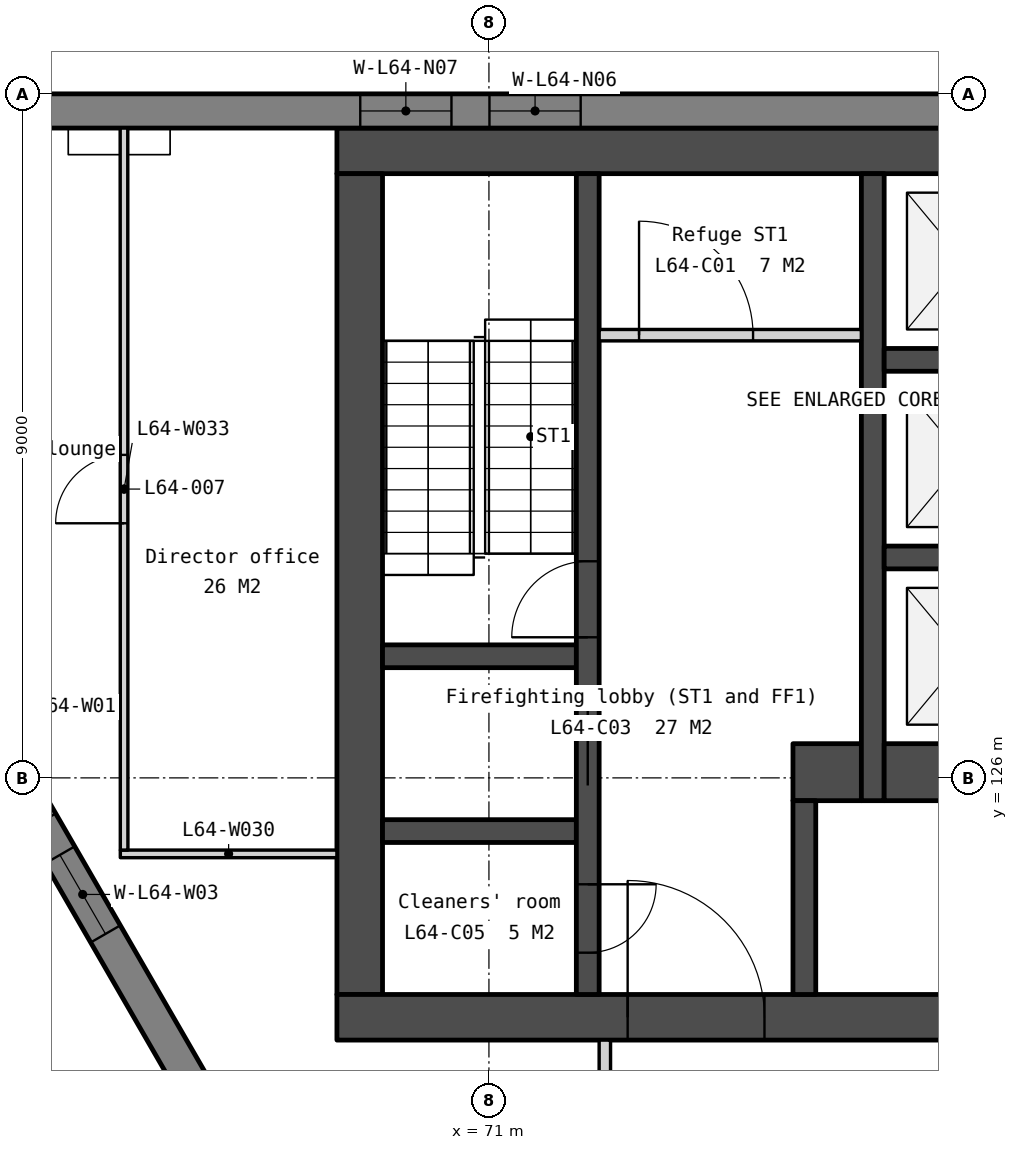
"""IFC4 building model, lengths in metres.
Left out: names, types, materials, properties, quantities, classifications, styles, units other than length and angle.
Written with IfcOpenShell. Run it as: python <this file> out.ifc"""

import sys

from ifc_helpers import new_model, si_unit, direction, frame, frame_2d, origin, place, context, subcontext, project, spatial, polyline, rectangle, outline, extrude, element, fill, save


model = new_model("IFC4")
c1 = context("Model", 3, precision=1e-05, world=origin(), true_north=direction((0.0, 1.0)))
c2 = subcontext(c1, "Body", "Model", "MODEL_VIEW")
j1 = project(units=[si_unit("LENGTHUNIT", "METRE"), si_unit("PLANEANGLEUNIT", "RADIAN")], contexts=[c1])
p1 = place(None, origin())
s1 = spatial("IfcSite", under=j1, at=p1, CompositionType="ELEMENT")
p2 = place(p1, origin())
s2 = spatial("IfcBuilding", under=s1, at=p2, CompositionType="ELEMENT")
p3 = place(p2, frame((0.0, 0.0, 262.1)))
s3 = spatial("IfcBuildingStorey", under=s2, at=p3, CompositionType="ELEMENT", Elevation=262.1)
p4 = place(p3, frame((69.0, 134.25, 0.0), z_axis=(0.0, 0.0, 1.0), x_axis=(1.0, 0.0, 0.0)))
e1 = element("IfcWall", 1, at=p4, inside=s3, PredefinedType="SOLIDWALL", context=c2, shape_type="SweptSolid", body=[
    extrude(rectangle(XDim=22.0, YDim=0.6, at=frame_2d((11.0, 0.0))), origin(), (0.0, 0.0, 1.0), 3.75),
])
p5 = place(p3, frame((69.3, 133.95, 0.0), z_axis=(0.0, 0.0, 1.0), x_axis=(0.0, -1.0, 0.0)))
e2 = element("IfcWall", 2, at=p5, inside=s3, PredefinedType="SOLIDWALL", context=c2, shape_type="SweptSolid", body=[
    extrude(rectangle(XDim=10.8, YDim=0.6, at=frame_2d((5.4, 0.0))), origin(), (0.0, 0.0, 1.0), 3.75),
])
p6 = place(p3, frame((69.0, 122.85, 0.0), z_axis=(0.0, 0.0, 1.0), x_axis=(1.0, 0.0, 0.0)))
e3 = element("IfcWall", 3, at=p6, inside=s3, PredefinedType="SOLIDWALL", context=c2, shape_type="SweptSolid", body=[
    extrude(rectangle(XDim=22.0, YDim=0.6, at=frame_2d((11.0, 0.0))), origin(), (0.0, 0.0, 1.0), 3.75),
])
p7 = place(p6, frame((16.375, 0.0, 0.0)))
e4 = element("IfcOpeningElement", 4, at=p7, cuts=e3, PredefinedType="OPENING", context=c2, shape_type="SweptSolid", body=[
    extrude(rectangle(XDim=1.8, YDim=2.1, at=frame_2d((0.9, 1.05))), frame((0.0, 0.31, 0.0), z_axis=(0.0, -1.0, 0.0), x_axis=(1.0, 0.0, 0.0)), (0.0, 0.0, 1.0), 0.62),
])
p8 = place(p6, frame((3.825, 0.0, 0.0)))
e5 = element("IfcOpeningElement", 5, at=p8, cuts=e3, PredefinedType="OPENING", context=c2, shape_type="SweptSolid", body=[
    extrude(rectangle(XDim=1.8, YDim=2.1, at=frame_2d((0.9, 1.05))), frame((0.0, 0.31, 0.0), z_axis=(0.0, -1.0, 0.0), x_axis=(1.0, 0.0, 0.0)), (0.0, 0.0, 1.0), 0.62),
])
p9 = place(p6, frame((12.85, 0.0, 0.0)))
e6 = element("IfcOpeningElement", 6, at=p9, cuts=e3, PredefinedType="OPENING", context=c2, shape_type="SweptSolid", body=[
    extrude(rectangle(XDim=1.5, YDim=2.1, at=frame_2d((0.75, 1.05))), frame((0.0, 0.31, 0.0), z_axis=(0.0, -1.0, 0.0), x_axis=(1.0, 0.0, 0.0)), (0.0, 0.0, 1.0), 0.62),
])
for number, where, z_axis, x_axis in (
    (7, (69.6, 127.6, 0.0), (0.0, 0.0, 1.0), (1.0, 0.0, 0.0)),
    (8, (69.6, 125.3, 0.0), (0.0, 0.0, 1.0), (1.0, 0.0, 0.0)),
):
    element("IfcWall", number, at=place(p3, frame(where, z_axis=z_axis, x_axis=x_axis)), inside=s3, PredefinedType="SOLIDWALL", context=c2, shape_type="SweptSolid", body=[
        extrude(rectangle(XDim=2.55, YDim=0.3, at=frame_2d((1.275, 0.0))), origin(), (0.0, 0.0, 1.0), 3.75),
    ])
p10 = place(p3, frame((72.3, 133.95, 0.0), z_axis=(0.0, 0.0, 1.0), x_axis=(0.0, -1.0, 0.0)))
e9 = element("IfcWall", 9, at=p10, inside=s3, PredefinedType="SOLIDWALL", context=c2, shape_type="SweptSolid", body=[
    extrude(rectangle(XDim=10.8, YDim=0.3, at=frame_2d((5.4, 0.0))), origin(), (0.0, 0.0, 1.0), 3.75),
])
p11 = place(p10, frame((6.95, 0.0, 0.0)))
e10 = element("IfcOpeningElement", 10, at=p11, cuts=e9, PredefinedType="OPENING", context=c2, shape_type="SweptSolid", body=[
    extrude(rectangle(XDim=1.1, YDim=2.1, at=frame_2d((0.55, 1.05))), frame((0.0, 0.16, 0.0), z_axis=(0.0, -1.0, 0.0), x_axis=(1.0, 0.0, 0.0)), (0.0, 0.0, 1.0), 0.32),
])
p12 = place(p10, frame((9.35, 0.0, 0.0)))
e11 = element("IfcOpeningElement", 11, at=p12, cuts=e9, PredefinedType="OPENING", context=c2, shape_type="SweptSolid", body=[
    extrude(rectangle(XDim=0.9, YDim=2.1, at=frame_2d((0.45, 1.05))), frame((0.0, 0.16, 0.0), z_axis=(0.0, -1.0, 0.0), x_axis=(1.0, 0.0, 0.0)), (0.0, 0.0, 1.0), 0.32),
])
p13 = place(p10, frame((5.1, 0.0, 0.0)))
e12 = element("IfcOpeningElement", 12, at=p13, cuts=e9, PredefinedType="OPENING", context=c2, shape_type="SweptSolid", body=[
    extrude(rectangle(XDim=1.0, YDim=2.1, at=frame_2d((0.5, 1.05))), frame((0.0, 0.16, 0.0), z_axis=(0.0, -1.0, 0.0), x_axis=(1.0, 0.0, 0.0)), (0.0, 0.0, 1.0), 0.32),
])
p14 = place(p3, frame((72.45, 131.825, 0.0), z_axis=(0.0, 0.0, 1.0), x_axis=(1.0, 0.0, 0.0)))
e13 = element("IfcWall", 13, at=p14, inside=s3, PredefinedType="PARTITIONING", context=c2, shape_type="SweptSolid", body=[
    extrude(rectangle(XDim=3.45, YDim=0.15, at=frame_2d((1.725, 0.0))), origin(), (0.0, 0.0, 1.0), 3.75),
])
p15 = place(p14, frame((0.525, 0.0, 0.0)))
e14 = element("IfcOpeningElement", 14, at=p15, cuts=e13, PredefinedType="OPENING", context=c2, shape_type="SweptSolid", body=[
    extrude(rectangle(XDim=1.5, YDim=2.1, at=frame_2d((0.75, 1.05))), frame((0.0, 0.085, 0.0), z_axis=(0.0, -1.0, 0.0), x_axis=(1.0, 0.0, 0.0)), (0.0, 0.0, 1.0), 0.17),
])
p16 = place(p3, frame((75.0, 126.075, 0.0), z_axis=(0.0, 0.0, 1.0), x_axis=(1.0, 0.0, 0.0)))
e15 = element("IfcWall", 15, at=p16, inside=s3, PredefinedType="SOLIDWALL", context=c2, shape_type="SweptSolid", body=[
    extrude(rectangle(XDim=0.9, YDim=0.75, at=frame_2d((0.45, 0.0))), origin(), (0.0, 0.0, 1.0), 3.75),
])
p17 = place(p3, frame((75.15, 125.7, 0.0), z_axis=(0.0, 0.0, 1.0), x_axis=(0.0, -1.0, 0.0)))
e16 = element("IfcWall", 16, at=p17, inside=s3, PredefinedType="SOLIDWALL", context=c2, shape_type="SweptSolid", body=[
    extrude(rectangle(XDim=2.55, YDim=0.3, at=frame_2d((1.275, 0.0))), origin(), (0.0, 0.0, 1.0), 3.75),
])
p18 = place(p3, frame((76.05, 133.95, 0.0), z_axis=(0.0, 0.0, 1.0), x_axis=(0.0, -1.0, 0.0)))
e17 = element("IfcWall", 17, at=p18, inside=s3, PredefinedType="SOLIDWALL", context=c2, shape_type="SweptSolid", body=[
    extrude(rectangle(XDim=8.25, YDim=0.3, at=frame_2d((4.125, 0.0))), origin(), (0.0, 0.0, 1.0), 3.75),
])
for number, where, z_axis, x_axis in (
    (18, (76.2, 131.5, 0.0), (0.0, 0.0, 1.0), (1.0, 0.0, 0.0)),
    (19, (76.2, 128.9, 0.0), (0.0, 0.0, 1.0), (1.0, 0.0, 0.0)),
):
    element("IfcWall", number, at=place(p3, frame(where, z_axis=z_axis, x_axis=x_axis)), inside=s3, PredefinedType="SOLIDWALL", context=c2, shape_type="SweptSolid", body=[
        extrude(rectangle(XDim=2.1, YDim=0.3, at=frame_2d((1.05, 0.0))), origin(), (0.0, 0.0, 1.0), 3.75),
    ])
p19 = place(p3, frame((76.2, 126.075, 0.0), z_axis=(0.0, 0.0, 1.0), x_axis=(1.0, 0.0, 0.0)))
e20 = element("IfcWall", 20, at=p19, inside=s3, PredefinedType="SOLIDWALL", context=c2, shape_type="SweptSolid", body=[
    extrude(rectangle(XDim=2.1, YDim=0.75, at=frame_2d((1.05, 0.0))), origin(), (0.0, 0.0, 1.0), 3.75),
])
p20 = place(p3, frame((98.486, 134.775, -0.15), z_axis=(0.0, 0.0, 1.0), x_axis=(-1.0, 0.0, 0.0)))
e21 = element("IfcWall", 21, at=p20, inside=s3, PredefinedType="SOLIDWALL", context=c2, shape_type="SweptSolid", body=[
    extrude(outline(polyline([(36.972, 0.0), (36.972, 3.9), (0.0, 3.9), (0.0, 0.0), (36.972, 0.0)])), frame((0.0, 0.225, 0.0), z_axis=(0.0, -1.0, 0.0), x_axis=(1.0, 0.0, 0.0)), (0.0, 0.0, 1.0), 0.45),
])
p21 = place(p20, frame((0.744, 0.0, 0.95)))
e22 = element("IfcOpeningElement", 22, at=p21, cuts=e21, PredefinedType="OPENING", context=c2, shape_type="SweptSolid", body=[
    extrude(rectangle(XDim=1.2, YDim=2.2, at=frame_2d((0.6, 1.1))), frame((0.0, 0.235, 0.0), z_axis=(0.0, -1.0, 0.0), x_axis=(1.0, 0.0, 0.0)), (0.0, 0.0, 1.0), 0.47),
])
p22 = place(p20, frame((7.793, 0.0, 0.95)))
e23 = element("IfcOpeningElement", 23, at=p22, cuts=e21, PredefinedType="OPENING", context=c2, shape_type="SweptSolid", body=[
    extrude(rectangle(XDim=1.2, YDim=2.2, at=frame_2d((0.6, 1.1))), frame((0.0, 0.235, 0.0), z_axis=(0.0, -1.0, 0.0), x_axis=(1.0, 0.0, 0.0)), (0.0, 0.0, 1.0), 0.47),
])
p23 = place(p20, frame((9.493, 0.0, 0.95)))
e24 = element("IfcOpeningElement", 24, at=p23, cuts=e21, PredefinedType="OPENING", context=c2, shape_type="SweptSolid", body=[
    extrude(rectangle(XDim=1.2, YDim=2.2, at=frame_2d((0.6, 1.1))), frame((0.0, 0.235, 0.0), z_axis=(0.0, -1.0, 0.0), x_axis=(1.0, 0.0, 0.0)), (0.0, 0.0, 1.0), 0.47),
])
p24 = place(p20, frame((17.036, 0.0, 0.95)))
e25 = element("IfcOpeningElement", 25, at=p24, cuts=e21, PredefinedType="OPENING", context=c2, shape_type="SweptSolid", body=[
    extrude(rectangle(XDim=1.2, YDim=2.2, at=frame_2d((0.6, 1.1))), frame((0.0, 0.235, 0.0), z_axis=(0.0, -1.0, 0.0), x_axis=(1.0, 0.0, 0.0)), (0.0, 0.0, 1.0), 0.47),
])
p25 = place(p20, frame((18.736, 0.0, 0.95)))
e26 = element("IfcOpeningElement", 26, at=p25, cuts=e21, PredefinedType="OPENING", context=c2, shape_type="SweptSolid", body=[
    extrude(rectangle(XDim=1.2, YDim=2.2, at=frame_2d((0.6, 1.1))), frame((0.0, 0.235, 0.0), z_axis=(0.0, -1.0, 0.0), x_axis=(1.0, 0.0, 0.0)), (0.0, 0.0, 1.0), 0.47),
])
p26 = place(p20, frame((26.279, 0.0, 0.95)))
e27 = element("IfcOpeningElement", 27, at=p26, cuts=e21, PredefinedType="OPENING", context=c2, shape_type="SweptSolid", body=[
    extrude(rectangle(XDim=1.2, YDim=2.2, at=frame_2d((0.6, 1.1))), frame((0.0, 0.235, 0.0), z_axis=(0.0, -1.0, 0.0), x_axis=(1.0, 0.0, 0.0)), (0.0, 0.0, 1.0), 0.47),
])
p27 = place(p20, frame((27.979, 0.0, 0.95)))
e28 = element("IfcOpeningElement", 28, at=p27, cuts=e21, PredefinedType="OPENING", context=c2, shape_type="SweptSolid", body=[
    extrude(rectangle(XDim=1.2, YDim=2.2, at=frame_2d((0.6, 1.1))), frame((0.0, 0.235, 0.0), z_axis=(0.0, -1.0, 0.0), x_axis=(1.0, 0.0, 0.0)), (0.0, 0.0, 1.0), 0.47),
])
p28 = place(p20, frame((35.028, 0.0, 0.95)))
e29 = element("IfcOpeningElement", 29, at=p28, cuts=e21, PredefinedType="OPENING", context=c2, shape_type="SweptSolid", body=[
    extrude(rectangle(XDim=1.2, YDim=2.2, at=frame_2d((0.6, 1.1))), frame((0.0, 0.235, 0.0), z_axis=(0.0, -1.0, 0.0), x_axis=(1.0, 0.0, 0.0)), (0.0, 0.0, 1.0), 0.47),
])
p29 = place(p3, frame((60.609, 133.207, -0.15), z_axis=(0.0, 0.0, 1.0), x_axis=(0.499996022837, -0.866027699989, 0.0)))
e30 = element("IfcWall", 30, at=p29, inside=s3, PredefinedType="SOLIDWALL", context=c2, shape_type="SweptSolid", body=[
    extrude(outline(polyline([(0.0, 0.0), (0.0, 3.9), (16.686, 3.9), (16.686, 0.0), (0.0, 0.0)])), frame((0.0, 0.225, 0.0), z_axis=(0.0, -1.0, 0.0), x_axis=(1.0, 0.0, 0.0)), (0.0, 0.0, 1.0), 0.45),
])
p30 = place(p29, frame((0.744, 0.0, 0.95)))
e31 = element("IfcOpeningElement", 31, at=p30, cuts=e30, PredefinedType="OPENING", context=c2, shape_type="SweptSolid", body=[
    extrude(rectangle(XDim=1.2, YDim=2.2, at=frame_2d((0.6, 1.1))), frame((0.0, 0.235, 0.0), z_axis=(0.0, -1.0, 0.0), x_axis=(1.0, 0.0, 0.0)), (0.0, 0.0, 1.0), 0.47),
])
p31 = place(p29, frame((7.793, 0.0, 0.95)))
e32 = element("IfcOpeningElement", 32, at=p31, cuts=e30, PredefinedType="OPENING", context=c2, shape_type="SweptSolid", body=[
    extrude(rectangle(XDim=1.2, YDim=2.2, at=frame_2d((0.6, 1.1))), frame((0.0, 0.235, 0.0), z_axis=(0.0, -1.0, 0.0), x_axis=(1.0, 0.0, 0.0)), (0.0, 0.0, 1.0), 0.47),
])
p32 = place(p29, frame((9.493, 0.0, 0.95)))
e33 = element("IfcOpeningElement", 33, at=p32, cuts=e30, PredefinedType="OPENING", context=c2, shape_type="SweptSolid", body=[
    extrude(rectangle(XDim=1.2, YDim=2.2, at=frame_2d((0.6, 1.1))), frame((0.0, 0.235, 0.0), z_axis=(0.0, -1.0, 0.0), x_axis=(1.0, 0.0, 0.0)), (0.0, 0.0, 1.0), 0.47),
])
p33 = place(p3, frame((72.525, 119.748, 0.0), z_axis=(0.0, 0.0, 1.0), x_axis=(0.0, 1.0, 0.0)))
e34 = element("IfcWall", 34, at=p33, inside=s3, PredefinedType="PARTITIONING", context=c2, shape_type="SweptSolid", body=[
    extrude(rectangle(XDim=2.802, YDim=0.15, at=frame_2d((1.401, 0.0))), origin(), (0.0, 0.0, 1.0), 3.75),
])
p34 = place(p33, frame((1.036, 0.0, 0.0)))
e35 = element("IfcOpeningElement", 35, at=p34, cuts=e34, PredefinedType="OPENING", context=c2, shape_type="SweptSolid", body=[
    extrude(rectangle(XDim=1.0, YDim=2.1, at=frame_2d((0.5, 1.05))), frame((0.0, 0.085, 0.0), z_axis=(0.0, -1.0, 0.0), x_axis=(1.0, 0.0, 0.0)), (0.0, 0.0, 1.0), 0.17),
])
p35 = place(p3, frame((66.15, 125.0, 0.0), z_axis=(0.0, 0.0, 1.0), x_axis=(1.0, 0.0, 0.0)))
e36 = element("IfcWall", 36, at=p35, inside=s3, PredefinedType="PARTITIONING", context=c2, shape_type="SweptSolid", body=[
    extrude(rectangle(XDim=2.85, YDim=0.1, at=frame_2d((1.425, 0.0))), origin(), (0.0, 0.0, 1.0), 3.75),
])
p36 = place(p3, frame((66.2, 125.05, 0.0), z_axis=(0.0, 0.0, 1.0), x_axis=(-0.000205592101, 0.999999978866, 0.0)))
e37 = element("IfcWall", 37, at=p36, inside=s3, PredefinedType="PARTITIONING", context=c2, shape_type="SweptSolid", body=[
    extrude(rectangle(XDim=9.5, YDim=0.1, at=frame_2d((4.75, 0.0))), origin(), (0.0, 0.0, 1.0), 3.75),
])
p37 = place(p36, frame((4.3, 0.0, 0.0)))
e38 = element("IfcOpeningElement", 38, at=p37, cuts=e37, PredefinedType="OPENING", context=c2, shape_type="SweptSolid", body=[
    extrude(rectangle(XDim=0.9, YDim=2.1, at=frame_2d((0.45, 1.05))), frame((0.0, 0.06, 0.0), z_axis=(0.0, -1.0, 0.0), x_axis=(1.0, 0.0, 0.0)), (0.0, 0.0, 1.0), 0.12),
])
p38 = place(p11, origin())
e39 = element("IfcDoor", 39, at=p38, inside=s3, OperationType="SLIDING_TO_LEFT", PredefinedType="DOOR", context=c2, shape_type="SweptSolid", body=[
    extrude(rectangle(XDim=1.1, YDim=2.1, at=frame_2d((0.55, 1.05))), frame((0.0, 0.025, 0.0), z_axis=(0.0, -1.0, 0.0), x_axis=(1.0, 0.0, 0.0)), (0.0, 0.0, 1.0), 0.05),
])
fill(e10, e39)
p39 = place(p8, origin())
e40 = element("IfcDoor", 40, at=p39, inside=s3, OperationType="DOUBLE_DOOR_DOUBLE_SWING", PredefinedType="DOOR", context=c2, shape_type="SweptSolid", body=[
    extrude(rectangle(XDim=1.8, YDim=2.1, at=frame_2d((0.9, 1.05))), frame((0.0, 0.025, 0.0), z_axis=(0.0, -1.0, 0.0), x_axis=(1.0, 0.0, 0.0)), (0.0, 0.0, 1.0), 0.05),
])
fill(e5, e40)
p40 = place(p15, origin())
e41 = element("IfcDoor", 41, at=p40, inside=s3, OperationType="DOUBLE_DOOR_DOUBLE_SWING", PredefinedType="DOOR", context=c2, shape_type="SweptSolid", body=[
    extrude(rectangle(XDim=1.5, YDim=2.1, at=frame_2d((0.75, 1.05))), frame((0.0, 0.025, 0.0), z_axis=(0.0, -1.0, 0.0), x_axis=(1.0, 0.0, 0.0)), (0.0, 0.0, 1.0), 0.05),
])
fill(e14, e41)
p41 = place(p12, origin())
e42 = element("IfcDoor", 42, at=p41, inside=s3, OperationType="SINGLE_SWING_LEFT", PredefinedType="DOOR", context=c2, shape_type="SweptSolid", body=[
    extrude(rectangle(XDim=0.9, YDim=2.1, at=frame_2d((0.45, 1.05))), frame((0.0, 0.025, 0.0), z_axis=(0.0, -1.0, 0.0), x_axis=(1.0, 0.0, 0.0)), (0.0, 0.0, 1.0), 0.05),
])
fill(e11, e42)
p42 = place(p13, origin())
e43 = element("IfcDoor", 43, at=p42, inside=s3, OperationType="SINGLE_SWING_RIGHT", PredefinedType="DOOR", context=c2, shape_type="SweptSolid", body=[
    extrude(rectangle(XDim=1.0, YDim=2.1, at=frame_2d((0.5, 1.05))), frame((0.0, 0.025, 0.0), z_axis=(0.0, -1.0, 0.0), x_axis=(1.0, 0.0, 0.0)), (0.0, 0.0, 1.0), 0.05),
])
fill(e12, e43)
p43 = place(p26, origin())
e44 = element("IfcWindow", 44, at=p43, inside=s3, PartitioningType="SINGLE_PANEL", PredefinedType="WINDOW", context=c2, shape_type="SweptSolid", body=[
    extrude(rectangle(XDim=1.2, YDim=2.2, at=frame_2d((0.6, 1.1))), frame((0.0, 0.03, 0.0), z_axis=(0.0, -1.0, 0.0), x_axis=(1.0, 0.0, 0.0)), (0.0, 0.0, 1.0), 0.06),
])
fill(e27, e44)
p44 = place(p27, origin())
e45 = element("IfcWindow", 45, at=p44, inside=s3, PartitioningType="SINGLE_PANEL", PredefinedType="WINDOW", context=c2, shape_type="SweptSolid", body=[
    extrude(rectangle(XDim=1.2, YDim=2.2, at=frame_2d((0.6, 1.1))), frame((0.0, 0.03, 0.0), z_axis=(0.0, -1.0, 0.0), x_axis=(1.0, 0.0, 0.0)), (0.0, 0.0, 1.0), 0.06),
])
fill(e28, e45)
p45 = place(p32, origin())
e46 = element("IfcWindow", 46, at=p45, inside=s3, PartitioningType="SINGLE_PANEL", PredefinedType="WINDOW", context=c2, shape_type="SweptSolid", body=[
    extrude(rectangle(XDim=1.2, YDim=2.2, at=frame_2d((0.6, 1.1))), frame((0.0, 0.03, 0.0), z_axis=(0.0, -1.0, 0.0), x_axis=(1.0, 0.0, 0.0)), (0.0, 0.0, 1.0), 0.06),
])
fill(e33, e46)
p46 = place(p37, origin())
e47 = element("IfcDoor", 47, at=p46, inside=s3, OperationType="SINGLE_SWING_LEFT", PredefinedType="DOOR", context=c2, shape_type="SweptSolid", body=[
    extrude(rectangle(XDim=0.9, YDim=2.1, at=frame_2d((0.45, 1.05))), frame((0.0, 0.025, 0.0), z_axis=(0.0, -1.0, 0.0), x_axis=(1.0, 0.0, 0.0)), (0.0, 0.0, 1.0), 0.05),
])
fill(e38, e47)
save(model, sys.argv[1])
